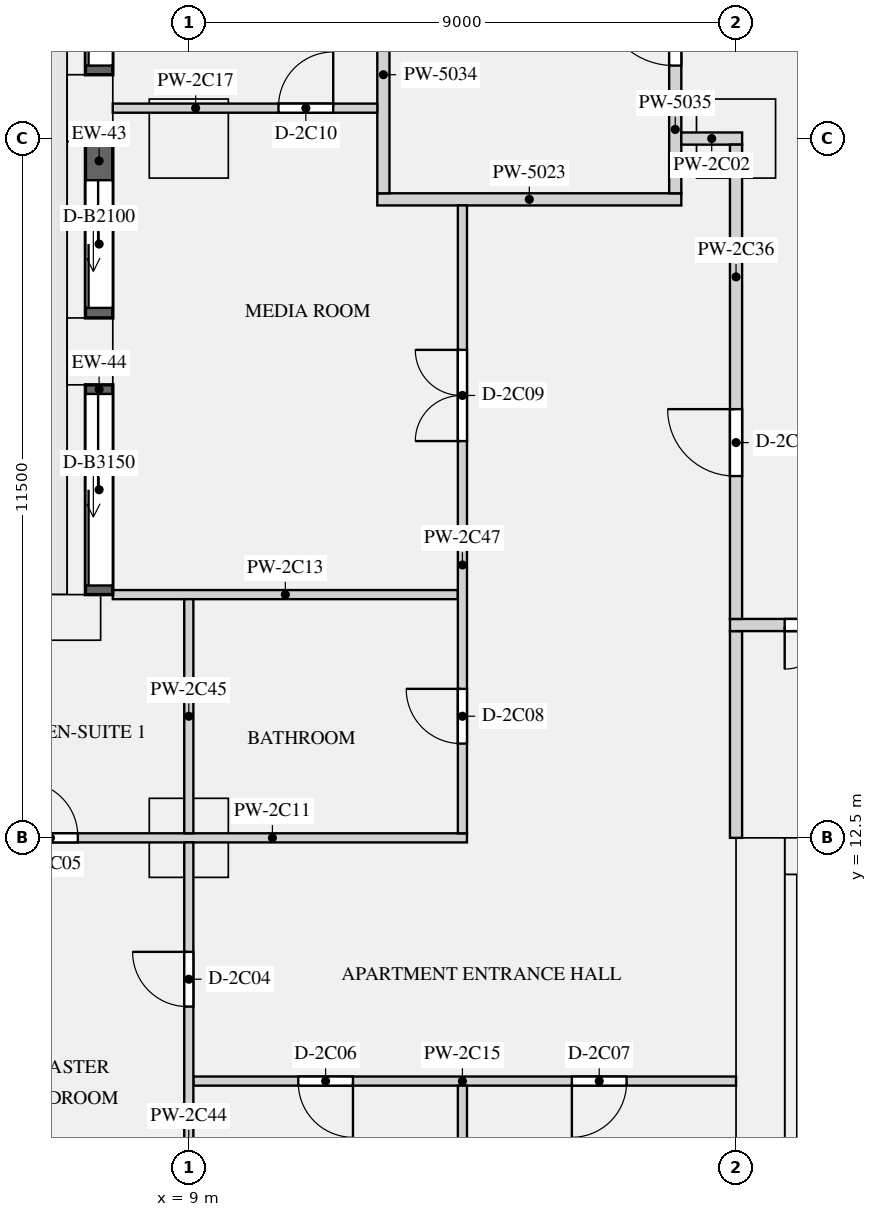
"""IFC4 building model, lengths in metres.
Left out: names, types, materials, properties, quantities, classifications, styles, units other than length and angle.
Written with IfcOpenShell. Run it as: python <this file> out.ifc"""

import sys

from ifc_helpers import new_model, si_unit, direction, frame, frame_2d, origin, origin_2d, place, context, subcontext, project, spatial, rectangle, extrude, element, fill, save


model = new_model("IFC4")
c1 = context("Model", 3, precision=1e-05, world=origin(), true_north=direction((0.0, 1.0)))
c2 = subcontext(c1, "Body", "Model", "MODEL_VIEW")
j1 = project(units=[si_unit("LENGTHUNIT", "METRE"), si_unit("PLANEANGLEUNIT", "RADIAN")], contexts=[c1])
p1 = place(None, origin())
s1 = spatial("IfcSite", under=j1, at=p1, CompositionType="ELEMENT")
p2 = place(p1, origin())
s2 = spatial("IfcBuilding", under=s1, at=p2, CompositionType="ELEMENT")
p3 = place(p2, frame((0.0, 0.0, 102.45)))
s3 = spatial("IfcBuildingStorey", under=s2, at=p3, CompositionType="ELEMENT", Elevation=102.45)
for number, where, z_axis, x_axis in (
    (1, (7.375, 24.5, 0.0), (0.0, 0.0, 1.0), (0.0, -1.0, 0.0)),
    (2, (7.375, 20.5, 0.0), (0.0, 0.0, 1.0), (0.0, -1.0, 0.0)),
    (3, (7.0, 16.125, 0.0), (0.0, 0.0, 1.0), (-1.0, 0.0, 0.0)),
):
    element("IfcColumn", number, at=place(p3, frame(where, z_axis=z_axis, x_axis=x_axis)), inside=s3, PredefinedType="USERDEFINED", context=c2, shape_type="SweptSolid", body=[
        extrude(rectangle(XDim=1.1, YDim=0.75, at=origin_2d()), origin(), (0.0, 0.0, 1.0), 3.15),
    ])
for number, where, z_axis, x_axis in (
    (4, (9.0, 24.0, 0.0), (0.0, 0.0, 1.0), (1.0, 0.0, 0.0)),
    (5, (18.0, 24.0, 0.0), (0.0, 0.0, 1.0), (1.0, 0.0, 0.0)),
    (6, (9.0, 12.5, 0.0), (0.0, 0.0, 1.0), (1.0, 0.0, 0.0)),
):
    element("IfcColumn", number, at=place(p3, frame(where, z_axis=z_axis, x_axis=x_axis)), inside=s3, PredefinedType="COLUMN", context=c2, shape_type="SweptSolid", body=[
        extrude(rectangle(XDim=1.3, YDim=1.3, at=origin_2d()), origin(), (0.0, 0.0, 1.0), 3.15),
    ])
p4 = place(p3, frame((18.4, 0.0, 0.0), z_axis=(0.0, 0.0, 1.0), x_axis=(0.0, 1.0, 0.0)))
e7 = element("IfcWall", 7, at=p4, inside=s3, PredefinedType="SHEAR", context=c2, shape_type="SweptSolid", body=[
    extrude(rectangle(XDim=12.5, YDim=0.8, at=frame_2d((6.25, 0.0))), origin(), (0.0, 0.0, 1.0), 3.15),
])
p5 = place(p3, frame((18.8, 12.2, 0.0), z_axis=(0.0, 0.0, 1.0), x_axis=(1.0, 0.0, 0.0)))
e8 = element("IfcWall", 8, at=p5, inside=s3, PredefinedType="SHEAR", context=c2, shape_type="SweptSolid", body=[
    extrude(rectangle(XDim=34.4, YDim=0.6, at=frame_2d((17.2, 0.0))), origin(), (0.0, 0.0, 1.0), 3.15),
])
p6 = place(p5, frame((24.375, 0.0, 0.0)))
e9 = element("IfcOpeningElement", 9, at=p6, cuts=e8, PredefinedType="OPENING", context=c2, shape_type="SweptSolid", body=[
    extrude(rectangle(XDim=1.1, YDim=2.1, at=frame_2d((0.55, 1.05))), frame((0.0, 0.31, 0.0), z_axis=(0.0, -1.0, 0.0), x_axis=(1.0, 0.0, 0.0)), (0.0, 0.0, 1.0), 0.62),
])
p7 = place(p5, frame((26.625, 0.0, 0.0)))
e10 = element("IfcOpeningElement", 10, at=p7, cuts=e8, PredefinedType="OPENING", context=c2, shape_type="SweptSolid", body=[
    extrude(rectangle(XDim=1.1, YDim=2.1, at=frame_2d((0.55, 1.05))), frame((0.0, 0.31, 0.0), z_axis=(0.0, -1.0, 0.0), x_axis=(1.0, 0.0, 0.0)), (0.0, 0.0, 1.0), 0.62),
])
p8 = place(p5, frame((28.875, 0.0, 0.0)))
e11 = element("IfcOpeningElement", 11, at=p8, cuts=e8, PredefinedType="OPENING", context=c2, shape_type="SweptSolid", body=[
    extrude(rectangle(XDim=1.1, YDim=2.1, at=frame_2d((0.55, 1.05))), frame((0.0, 0.31, 0.0), z_axis=(0.0, -1.0, 0.0), x_axis=(1.0, 0.0, 0.0)), (0.0, 0.0, 1.0), 0.62),
])
p9 = place(p5, frame((4.75, 0.0, 0.0)))
e12 = element("IfcOpeningElement", 12, at=p9, cuts=e8, PredefinedType="OPENING", context=c2, shape_type="SweptSolid", body=[
    extrude(rectangle(XDim=0.9, YDim=2.1, at=frame_2d((0.45, 1.05))), frame((0.0, 0.31, 0.0), z_axis=(0.0, -1.0, 0.0), x_axis=(1.0, 0.0, 0.0)), (0.0, 0.0, 1.0), 0.62),
])
p10 = place(p5, frame((13.75, 0.0, 0.0)))
e13 = element("IfcOpeningElement", 13, at=p10, cuts=e8, PredefinedType="OPENING", context=c2, shape_type="SweptSolid", body=[
    extrude(rectangle(XDim=0.9, YDim=2.1, at=frame_2d((0.45, 1.05))), frame((0.0, 0.31, 0.0), z_axis=(0.0, -1.0, 0.0), x_axis=(1.0, 0.0, 0.0)), (0.0, 0.0, 1.0), 0.62),
])
p11 = place(p5, frame((18.25, 0.0, 0.0)))
e14 = element("IfcOpeningElement", 14, at=p11, cuts=e8, PredefinedType="OPENING", context=c2, shape_type="SweptSolid", body=[
    extrude(rectangle(XDim=0.9, YDim=2.1, at=frame_2d((0.45, 1.05))), frame((0.0, 0.31, 0.0), z_axis=(0.0, -1.0, 0.0), x_axis=(1.0, 0.0, 0.0)), (0.0, 0.0, 1.0), 0.62),
])
p12 = place(p5, frame((1.35, 0.0, 0.0)))
e15 = element("IfcOpeningElement", 15, at=p12, cuts=e8, PredefinedType="OPENING", context=c2, shape_type="SweptSolid", body=[
    extrude(rectangle(XDim=1.2, YDim=2.1, at=frame_2d((0.6, 1.05))), frame((0.0, 0.31, 0.0), z_axis=(0.0, -1.0, 0.0), x_axis=(1.0, 0.0, 0.0)), (0.0, 0.0, 1.0), 0.62),
])
p13 = place(p5, frame((31.85, 0.0, 0.0)))
e16 = element("IfcOpeningElement", 16, at=p13, cuts=e8, PredefinedType="OPENING", context=c2, shape_type="SweptSolid", body=[
    extrude(rectangle(XDim=1.2, YDim=2.1, at=frame_2d((0.6, 1.05))), frame((0.0, 0.31, 0.0), z_axis=(0.0, -1.0, 0.0), x_axis=(1.0, 0.0, 0.0)), (0.0, 0.0, 1.0), 0.62),
])
p14 = place(p3, frame((18.9, 1.0, 0.0), z_axis=(0.0, 0.0, 1.0), x_axis=(0.0, 1.0, 0.0)))
e17 = element("IfcWall", 17, at=p14, inside=s3, PredefinedType="SHEAR", context=c2, shape_type="SweptSolid", body=[
    extrude(rectangle(XDim=10.9, YDim=0.2, at=frame_2d((5.45, 0.0))), origin(), (0.0, 0.0, 1.0), 3.15),
])
p15 = place(p3, frame((7.525, 27.95, 0.0), z_axis=(0.0, 0.0, 1.0), x_axis=(0.0, -1.0, 0.0)))
e18 = element("IfcWall", 18, at=p15, inside=s3, PredefinedType="SOLIDWALL", context=c2, shape_type="SweptSolid", body=[
    extrude(rectangle(XDim=2.9, YDim=0.45, at=frame_2d((1.45, 0.0))), origin(), (0.0, 0.0, 1.0), 2.83),
])
p16 = place(p15, frame((0.15, 0.0, 0.0)))
e19 = element("IfcOpeningElement", 19, at=p16, cuts=e18, PredefinedType="OPENING", context=c2, shape_type="SweptSolid", body=[
    extrude(rectangle(XDim=2.6, YDim=2.3, at=frame_2d((1.3, 1.15))), frame((0.0, 0.235, 0.0), z_axis=(0.0, -1.0, 0.0), x_axis=(1.0, 0.0, 0.0)), (0.0, 0.0, 1.0), 0.47),
])
p17 = place(p3, frame((7.525, 23.95, 0.0), z_axis=(0.0, 0.0, 1.0), x_axis=(0.0, -1.0, 0.0)))
e20 = element("IfcWall", 20, at=p17, inside=s3, PredefinedType="SOLIDWALL", context=c2, shape_type="SweptSolid", body=[
    extrude(rectangle(XDim=2.9, YDim=0.45, at=frame_2d((1.45, 0.0))), origin(), (0.0, 0.0, 1.0), 2.83),
])
p18 = place(p17, frame((0.635, 0.0, 0.0)))
e21 = element("IfcOpeningElement", 21, at=p18, cuts=e20, PredefinedType="OPENING", context=c2, shape_type="SweptSolid", body=[
    extrude(rectangle(XDim=2.1, YDim=2.3, at=frame_2d((1.05, 1.15))), frame((0.0, 0.235, 0.0), z_axis=(0.0, -1.0, 0.0), x_axis=(1.0, 0.0, 0.0)), (0.0, 0.0, 1.0), 0.47),
])
p19 = place(p3, frame((7.525, 19.95, 0.0), z_axis=(0.0, 0.0, 1.0), x_axis=(0.0, -1.0, 0.0)))
e22 = element("IfcWall", 22, at=p19, inside=s3, PredefinedType="SOLIDWALL", context=c2, shape_type="SweptSolid", body=[
    extrude(rectangle(XDim=3.45, YDim=0.45, at=frame_2d((1.725, 0.0))), origin(), (0.0, 0.0, 1.0), 2.83),
])
p20 = place(p19, frame((0.15, 0.0, 0.0)))
e23 = element("IfcOpeningElement", 23, at=p20, cuts=e22, PredefinedType="OPENING", context=c2, shape_type="SweptSolid", body=[
    extrude(rectangle(XDim=3.15, YDim=2.3, at=frame_2d((1.575, 1.15))), frame((0.0, 0.235, 0.0), z_axis=(0.0, -1.0, 0.0), x_axis=(1.0, 0.0, 0.0)), (0.0, 0.0, 1.0), 0.47),
])
p21 = place(p3, frame((12.1, 23.0, 0.0), z_axis=(0.0, 0.0, 1.0), x_axis=(1.0, 0.0, 0.0)))
e24 = element("IfcWall", 24, at=p21, inside=s3, PredefinedType="PARTITIONING", context=c2, shape_type="SweptSolid", body=[
    extrude(rectangle(XDim=5.0, YDim=0.2, at=frame_2d((2.5, 0.0))), origin(), (0.0, 0.0, 1.0), 2.83),
])
p22 = place(p3, frame((18.0, 12.5, 0.0), z_axis=(0.0, 0.0, 1.0), x_axis=(0.0, 1.0, 0.0)))
e25 = element("IfcWall", 25, at=p22, inside=s3, PredefinedType="PARTITIONING", context=c2, shape_type="SweptSolid", body=[
    extrude(rectangle(XDim=3.4, YDim=0.2, at=frame_2d((1.7, 0.0))), origin(), (0.0, 0.0, 1.0), 2.83),
])
p23 = place(p3, frame((12.2, 23.1, 0.0), z_axis=(0.0, 0.0, 1.0), x_axis=(0.0, 1.0, 0.0)))
e26 = element("IfcWall", 26, at=p23, inside=s3, PredefinedType="PARTITIONING", context=c2, shape_type="SweptSolid", body=[
    extrude(rectangle(XDim=3.9, YDim=0.2, at=frame_2d((1.95, 0.0))), origin(), (0.0, 0.0, 1.0), 2.83),
])
p24 = place(p3, frame((17.0, 23.1, 0.0), z_axis=(0.0, 0.0, 1.0), x_axis=(0.0, 1.0, 0.0)))
e27 = element("IfcWall", 27, at=p24, inside=s3, PredefinedType="PARTITIONING", context=c2, shape_type="SweptSolid", body=[
    extrude(rectangle(XDim=3.8, YDim=0.2, at=frame_2d((1.9, 0.0))), origin(), (0.0, 0.0, 1.0), 2.83),
])
p25 = place(p24, frame((2.1, 0.0, 0.0)))
e28 = element("IfcOpeningElement", 28, at=p25, cuts=e27, PredefinedType="OPENING", context=c2, shape_type="SweptSolid", body=[
    extrude(rectangle(XDim=1.2, YDim=2.1, at=frame_2d((0.6, 1.05))), frame((0.0, 0.11, 0.0), z_axis=(0.0, -1.0, 0.0), x_axis=(1.0, 0.0, 0.0)), (0.0, 0.0, 1.0), 0.22),
])
p26 = place(p3, frame((17.1, 24.0, 0.0), z_axis=(0.0, 0.0, 1.0), x_axis=(1.0, 0.0, 0.0)))
e29 = element("IfcWall", 29, at=p26, inside=s3, PredefinedType="PARTITIONING", context=c2, shape_type="SweptSolid", body=[
    extrude(rectangle(XDim=1.0, YDim=0.2, at=frame_2d((0.5, 0.0))), origin(), (0.0, 0.0, 1.0), 2.83),
])
p27 = place(p3, frame((5.25, 12.5, 0.0), z_axis=(0.0, 0.0, 1.0), x_axis=(1.0, 0.0, 0.0)))
e30 = element("IfcWall", 30, at=p27, inside=s3, PredefinedType="PARTITIONING", context=c2, shape_type="SweptSolid", body=[
    extrude(rectangle(XDim=8.325, YDim=0.15, at=frame_2d((4.163, 0.0))), origin(), (0.0, 0.0, 1.0), 2.83),
])
p28 = place(p27, frame((1.025, 0.0, 0.0)))
e31 = element("IfcOpeningElement", 31, at=p28, cuts=e30, PredefinedType="OPENING", context=c2, shape_type="SweptSolid", body=[
    extrude(rectangle(XDim=0.9, YDim=2.1, at=frame_2d((0.45, 1.05))), frame((0.0, 0.085, 0.0), z_axis=(0.0, -1.0, 0.0), x_axis=(1.0, 0.0, 0.0)), (0.0, 0.0, 1.0), 0.17),
])
p29 = place(p3, frame((7.75, 16.5, 0.0), z_axis=(0.0, 0.0, 1.0), x_axis=(1.0, 0.0, 0.0)))
e32 = element("IfcWall", 32, at=p29, inside=s3, PredefinedType="PARTITIONING", context=c2, shape_type="SweptSolid", body=[
    extrude(rectangle(XDim=5.675, YDim=0.15, at=frame_2d((2.837, 0.0))), origin(), (0.0, 0.0, 1.0), 2.83),
])
p30 = place(p3, frame((9.075, 8.5, 0.0), z_axis=(0.0, 0.0, 1.0), x_axis=(1.0, 0.0, 0.0)))
e33 = element("IfcWall", 33, at=p30, inside=s3, PredefinedType="PARTITIONING", context=c2, shape_type="SweptSolid", body=[
    extrude(rectangle(XDim=8.925, YDim=0.15, at=frame_2d((4.462, 0.0))), origin(), (0.0, 0.0, 1.0), 2.83),
])
p31 = place(p30, frame((1.725, 0.0, 0.0)))
e34 = element("IfcOpeningElement", 34, at=p31, cuts=e33, PredefinedType="OPENING", context=c2, shape_type="SweptSolid", body=[
    extrude(rectangle(XDim=0.9, YDim=2.1, at=frame_2d((0.45, 1.05))), frame((0.0, 0.085, 0.0), z_axis=(0.0, -1.0, 0.0), x_axis=(1.0, 0.0, 0.0)), (0.0, 0.0, 1.0), 0.17),
])
p32 = place(p30, frame((6.225, 0.0, 0.0)))
e35 = element("IfcOpeningElement", 35, at=p32, cuts=e33, PredefinedType="OPENING", context=c2, shape_type="SweptSolid", body=[
    extrude(rectangle(XDim=0.9, YDim=2.1, at=frame_2d((0.45, 1.05))), frame((0.0, 0.085, 0.0), z_axis=(0.0, -1.0, 0.0), x_axis=(1.0, 0.0, 0.0)), (0.0, 0.0, 1.0), 0.17),
])
p33 = place(p3, frame((7.75, 24.5, 0.0), z_axis=(0.0, 0.0, 1.0), x_axis=(1.0, 0.0, 0.0)))
e36 = element("IfcWall", 36, at=p33, inside=s3, PredefinedType="PARTITIONING", context=c2, shape_type="SweptSolid", body=[
    extrude(rectangle(XDim=4.35, YDim=0.15, at=frame_2d((2.175, 0.0))), origin(), (0.0, 0.0, 1.0), 2.83),
])
p34 = place(p33, frame((2.725, 0.0, 0.0)))
e37 = element("IfcOpeningElement", 37, at=p34, cuts=e36, PredefinedType="OPENING", context=c2, shape_type="SweptSolid", body=[
    extrude(rectangle(XDim=0.9, YDim=2.1, at=frame_2d((0.45, 1.05))), frame((0.0, 0.085, 0.0), z_axis=(0.0, -1.0, 0.0), x_axis=(1.0, 0.0, 0.0)), (0.0, 0.0, 1.0), 0.17),
])
p35 = place(p3, frame((17.9, 16.0, 0.0), z_axis=(0.0, 0.0, 1.0), x_axis=(1.0, 0.0, 0.0)))
e38 = element("IfcWall", 38, at=p35, inside=s3, PredefinedType="PARTITIONING", context=c2, shape_type="SweptSolid", body=[
    extrude(rectangle(XDim=36.2, YDim=0.2, at=frame_2d((18.1, 0.0))), origin(), (0.0, 0.0, 1.0), 2.83),
])
p36 = place(p35, frame((0.9, 0.0, 0.0)))
e39 = element("IfcOpeningElement", 39, at=p36, cuts=e38, PredefinedType="OPENING", context=c2, shape_type="SweptSolid", body=[
    extrude(rectangle(XDim=1.4, YDim=2.1, at=frame_2d((0.7, 1.05))), frame((0.0, 0.11, 0.0), z_axis=(0.0, -1.0, 0.0), x_axis=(1.0, 0.0, 0.0)), (0.0, 0.0, 1.0), 0.22),
])
p37 = place(p35, frame((33.9, 0.0, 0.0)))
e40 = element("IfcOpeningElement", 40, at=p37, cuts=e38, PredefinedType="OPENING", context=c2, shape_type="SweptSolid", body=[
    extrude(rectangle(XDim=1.4, YDim=2.1, at=frame_2d((0.7, 1.05))), frame((0.0, 0.11, 0.0), z_axis=(0.0, -1.0, 0.0), x_axis=(1.0, 0.0, 0.0)), (0.0, 0.0, 1.0), 0.22),
])
p38 = place(p3, frame((18.0, 16.1, 0.0), z_axis=(0.0, 0.0, 1.0), x_axis=(0.0, 1.0, 0.0)))
e41 = element("IfcWall", 41, at=p38, inside=s3, PredefinedType="PARTITIONING", context=c2, shape_type="SweptSolid", body=[
    extrude(rectangle(XDim=7.8, YDim=0.2, at=frame_2d((3.9, 0.0))), origin(), (0.0, 0.0, 1.0), 2.83),
])
p39 = place(p38, frame((2.35, 0.0, 0.0)))
e42 = element("IfcOpeningElement", 42, at=p39, cuts=e41, PredefinedType="OPENING", context=c2, shape_type="SweptSolid", body=[
    extrude(rectangle(XDim=1.1, YDim=2.1, at=frame_2d((0.55, 1.05))), frame((0.0, 0.11, 0.0), z_axis=(0.0, -1.0, 0.0), x_axis=(1.0, 0.0, 0.0)), (0.0, 0.0, 1.0), 0.22),
])
p40 = place(p3, frame((9.0, 5.25, 0.0), z_axis=(0.0, 0.0, 1.0), x_axis=(0.0, 1.0, 0.0)))
e43 = element("IfcWall", 43, at=p40, inside=s3, PredefinedType="PARTITIONING", context=c2, shape_type="SweptSolid", body=[
    extrude(rectangle(XDim=7.175, YDim=0.15, at=frame_2d((3.587, 0.0))), origin(), (0.0, 0.0, 1.0), 2.83),
])
p41 = place(p40, frame((4.475, 0.0, 0.0)))
e44 = element("IfcOpeningElement", 44, at=p41, cuts=e43, PredefinedType="OPENING", context=c2, shape_type="SweptSolid", body=[
    extrude(rectangle(XDim=0.9, YDim=2.1, at=frame_2d((0.45, 1.05))), frame((0.0, 0.085, 0.0), z_axis=(0.0, -1.0, 0.0), x_axis=(1.0, 0.0, 0.0)), (0.0, 0.0, 1.0), 0.17),
])
p42 = place(p3, frame((9.0, 12.575, 0.0), z_axis=(0.0, 0.0, 1.0), x_axis=(0.0, 1.0, 0.0)))
e45 = element("IfcWall", 45, at=p42, inside=s3, PredefinedType="PARTITIONING", context=c2, shape_type="SweptSolid", body=[
    extrude(rectangle(XDim=3.85, YDim=0.15, at=frame_2d((1.925, 0.0))), origin(), (0.0, 0.0, 1.0), 2.83),
])
p43 = place(p3, frame((13.5, 0.75, 0.0), z_axis=(0.0, 0.0, 1.0), x_axis=(0.0, 1.0, 0.0)))
e46 = element("IfcWall", 46, at=p43, inside=s3, PredefinedType="PARTITIONING", context=c2, shape_type="SweptSolid", body=[
    extrude(rectangle(XDim=7.675, YDim=0.15, at=frame_2d((3.837, 0.0))), origin(), (0.0, 0.0, 1.0), 2.83),
])
p44 = place(p3, frame((13.5, 12.575, 0.0), z_axis=(0.0, 0.0, 1.0), x_axis=(0.0, 1.0, 0.0)))
e47 = element("IfcWall", 47, at=p44, inside=s3, PredefinedType="PARTITIONING", context=c2, shape_type="SweptSolid", body=[
    extrude(rectangle(XDim=10.325, YDim=0.15, at=frame_2d((5.163, 0.0))), origin(), (0.0, 0.0, 1.0), 2.83),
])
p45 = place(p44, frame((1.475, 0.0, 0.0)))
e48 = element("IfcOpeningElement", 48, at=p45, cuts=e47, PredefinedType="OPENING", context=c2, shape_type="SweptSolid", body=[
    extrude(rectangle(XDim=0.9, YDim=2.1, at=frame_2d((0.45, 1.05))), frame((0.0, 0.085, 0.0), z_axis=(0.0, -1.0, 0.0), x_axis=(1.0, 0.0, 0.0)), (0.0, 0.0, 1.0), 0.17),
])
p46 = place(p44, frame((6.45, 0.0, 0.0)))
e49 = element("IfcOpeningElement", 49, at=p46, cuts=e47, PredefinedType="OPENING", context=c2, shape_type="SweptSolid", body=[
    extrude(rectangle(XDim=1.5, YDim=2.1, at=frame_2d((0.75, 1.05))), frame((0.0, 0.085, 0.0), z_axis=(0.0, -1.0, 0.0), x_axis=(1.0, 0.0, 0.0)), (0.0, 0.0, 1.0), 0.17),
])
p47 = place(p16, origin())
e50 = element("IfcDoor", 50, at=p47, inside=s3, OperationType="SLIDING_TO_LEFT", PredefinedType="DOOR", context=c2, shape_type="SweptSolid", body=[
    extrude(rectangle(XDim=2.6, YDim=2.3, at=frame_2d((1.3, 1.15))), frame((0.0, -0.07, 0.0), z_axis=(0.0, -1.0, 0.0), x_axis=(1.0, 0.0, 0.0)), (0.0, 0.0, 1.0), 0.05),
])
fill(e19, e50)
p48 = place(p18, origin())
e51 = element("IfcDoor", 51, at=p48, inside=s3, OperationType="SLIDING_TO_LEFT", PredefinedType="DOOR", context=c2, shape_type="SweptSolid", body=[
    extrude(rectangle(XDim=2.1, YDim=2.3, at=frame_2d((1.05, 1.15))), frame((0.0, -0.07, 0.0), z_axis=(0.0, -1.0, 0.0), x_axis=(1.0, 0.0, 0.0)), (0.0, 0.0, 1.0), 0.05),
])
fill(e21, e51)
p49 = place(p20, origin())
e52 = element("IfcDoor", 52, at=p49, inside=s3, OperationType="SLIDING_TO_LEFT", PredefinedType="DOOR", context=c2, shape_type="SweptSolid", body=[
    extrude(rectangle(XDim=3.15, YDim=2.3, at=frame_2d((1.575, 1.15))), frame((0.0, -0.07, 0.0), z_axis=(0.0, -1.0, 0.0), x_axis=(1.0, 0.0, 0.0)), (0.0, 0.0, 1.0), 0.05),
])
fill(e23, e52)
p50 = place(p25, origin())
e53 = element("IfcDoor", 53, at=p50, inside=s3, OperationType="SINGLE_SWING_RIGHT", PredefinedType="DOOR", context=c2, shape_type="SweptSolid", body=[
    extrude(rectangle(XDim=1.2, YDim=2.1, at=frame_2d((0.6, 1.05))), frame((0.0, 0.025, 0.0), z_axis=(0.0, -1.0, 0.0), x_axis=(1.0, 0.0, 0.0)), (0.0, 0.0, 1.0), 0.05),
])
fill(e28, e53)
p51 = place(p36, frame((1.4, 0.0, 0.0), z_axis=(0.0, 0.0, 1.0), x_axis=(-1.0, 0.0, 0.0)))
e54 = element("IfcDoor", 54, at=p51, inside=s3, OperationType="DOUBLE_DOOR_SINGLE_SWING", PredefinedType="DOOR", context=c2, shape_type="SweptSolid", body=[
    extrude(rectangle(XDim=1.4, YDim=2.1, at=frame_2d((0.7, 1.05))), frame((0.0, 0.025, 0.0), z_axis=(0.0, -1.0, 0.0), x_axis=(1.0, 0.0, 0.0)), (0.0, 0.0, 1.0), 0.05),
])
fill(e39, e54)
p52 = place(p39, origin())
e55 = element("IfcDoor", 55, at=p52, inside=s3, OperationType="SINGLE_SWING_RIGHT", PredefinedType="DOOR", context=c2, shape_type="SweptSolid", body=[
    extrude(rectangle(XDim=1.1, YDim=2.1, at=frame_2d((0.55, 1.05))), frame((0.0, 0.025, 0.0), z_axis=(0.0, -1.0, 0.0), x_axis=(1.0, 0.0, 0.0)), (0.0, 0.0, 1.0), 0.05),
])
fill(e42, e55)
p53 = place(p41, origin())
e56 = element("IfcDoor", 56, at=p53, inside=s3, OperationType="SINGLE_SWING_RIGHT", PredefinedType="DOOR", context=c2, shape_type="SweptSolid", body=[
    extrude(rectangle(XDim=0.9, YDim=2.1, at=frame_2d((0.45, 1.05))), frame((0.0, 0.025, 0.0), z_axis=(0.0, -1.0, 0.0), x_axis=(1.0, 0.0, 0.0)), (0.0, 0.0, 1.0), 0.05),
])
fill(e44, e56)
p54 = place(p28, origin())
e57 = element("IfcDoor", 57, at=p54, inside=s3, OperationType="SINGLE_SWING_LEFT", PredefinedType="DOOR", context=c2, shape_type="SweptSolid", body=[
    extrude(rectangle(XDim=0.9, YDim=2.1, at=frame_2d((0.45, 1.05))), frame((0.0, 0.025, 0.0), z_axis=(0.0, -1.0, 0.0), x_axis=(1.0, 0.0, 0.0)), (0.0, 0.0, 1.0), 0.05),
])
fill(e31, e57)
p55 = place(p31, frame((0.9, 0.0, 0.0), z_axis=(0.0, 0.0, 1.0), x_axis=(-1.0, 0.0, 0.0)))
e58 = element("IfcDoor", 58, at=p55, inside=s3, OperationType="SINGLE_SWING_LEFT", PredefinedType="DOOR", context=c2, shape_type="SweptSolid", body=[
    extrude(rectangle(XDim=0.9, YDim=2.1, at=frame_2d((0.45, 1.05))), frame((0.0, 0.025, 0.0), z_axis=(0.0, -1.0, 0.0), x_axis=(1.0, 0.0, 0.0)), (0.0, 0.0, 1.0), 0.05),
])
fill(e34, e58)
p56 = place(p32, frame((0.9, 0.0, 0.0), z_axis=(0.0, 0.0, 1.0), x_axis=(-1.0, 0.0, 0.0)))
e59 = element("IfcDoor", 59, at=p56, inside=s3, OperationType="SINGLE_SWING_RIGHT", PredefinedType="DOOR", context=c2, shape_type="SweptSolid", body=[
    extrude(rectangle(XDim=0.9, YDim=2.1, at=frame_2d((0.45, 1.05))), frame((0.0, 0.025, 0.0), z_axis=(0.0, -1.0, 0.0), x_axis=(1.0, 0.0, 0.0)), (0.0, 0.0, 1.0), 0.05),
])
fill(e35, e59)
p57 = place(p45, origin())
e60 = element("IfcDoor", 60, at=p57, inside=s3, OperationType="SINGLE_SWING_RIGHT", PredefinedType="DOOR", context=c2, shape_type="SweptSolid", body=[
    extrude(rectangle(XDim=0.9, YDim=2.1, at=frame_2d((0.45, 1.05))), frame((0.0, 0.025, 0.0), z_axis=(0.0, -1.0, 0.0), x_axis=(1.0, 0.0, 0.0)), (0.0, 0.0, 1.0), 0.05),
])
fill(e48, e60)
p58 = place(p46, origin())
e61 = element("IfcDoor", 61, at=p58, inside=s3, OperationType="DOUBLE_DOOR_SINGLE_SWING", PredefinedType="DOOR", context=c2, shape_type="SweptSolid", body=[
    extrude(rectangle(XDim=1.5, YDim=2.1, at=frame_2d((0.75, 1.05))), frame((0.0, 0.025, 0.0), z_axis=(0.0, -1.0, 0.0), x_axis=(1.0, 0.0, 0.0)), (0.0, 0.0, 1.0), 0.05),
])
fill(e49, e61)
p59 = place(p34, origin())
e62 = element("IfcDoor", 62, at=p59, inside=s3, OperationType="SINGLE_SWING_RIGHT", PredefinedType="DOOR", context=c2, shape_type="SweptSolid", body=[
    extrude(rectangle(XDim=0.9, YDim=2.1, at=frame_2d((0.45, 1.05))), frame((0.0, 0.025, 0.0), z_axis=(0.0, -1.0, 0.0), x_axis=(1.0, 0.0, 0.0)), (0.0, 0.0, 1.0), 0.05),
])
fill(e37, e62)
save(model, sys.argv[1])
